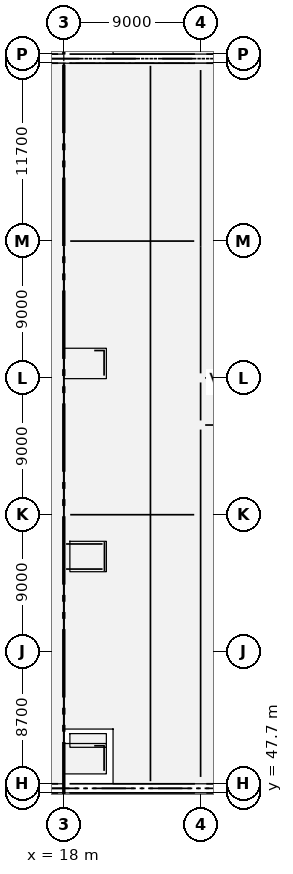
"""IFC4 building model, lengths in metres.
Left out: names, types, materials, properties, quantities, classifications, styles, units other than length and angle.
Written with IfcOpenShell. Run it as: python <this file> out.ifc"""

import sys

from ifc_helpers import new_model, si_unit, direction, frame, frame_2d, origin, origin_2d, place, context, subcontext, project, spatial, rectangle, extrude, element, fill, save


model = new_model("IFC4")
c1 = context("Model", 3, precision=1e-05, world=origin(), true_north=direction((0.0, 1.0)))
c2 = subcontext(c1, "Body", "Model", "MODEL_VIEW")
j1 = project(units=[si_unit("LENGTHUNIT", "METRE"), si_unit("PLANEANGLEUNIT", "RADIAN")], contexts=[c1])
p1 = place(None, origin())
s1 = spatial("IfcSite", under=j1, at=p1, CompositionType="ELEMENT")
p2 = place(p1, origin())
s2 = spatial("IfcBuilding", under=s1, at=p2, CompositionType="ELEMENT")
p3 = place(p2, origin())
s3 = spatial("IfcBuildingStorey", under=s2, at=p3, CompositionType="ELEMENT", Elevation=0.0)
p4 = place(p3, frame((18.0, 24.0, -0.5), z_axis=(0.0, 0.0, 1.0), x_axis=(0.0, 1.0, 0.0)))
e1 = element("IfcWall", 1, at=p4, inside=s3, PredefinedType="SOLIDWALL", context=c2, shape_type="SweptSolid", body=[
    extrude(rectangle(XDim=23.7, YDim=0.3, at=frame_2d((11.85, 0.0))), origin(), (0.0, 0.0, 1.0), 1.725),
])
p5 = place(p3, frame((18.0, 48.3, -0.5), z_axis=(0.0, 0.0, 1.0), x_axis=(0.0, 1.0, 0.0)))
e2 = element("IfcWall", 2, at=p5, inside=s3, PredefinedType="SOLIDWALL", context=c2, shape_type="SweptSolid", body=[
    extrude(rectangle(XDim=47.4, YDim=0.3, at=frame_2d((23.7, 0.0))), origin(), (0.0, 0.0, 1.0), 1.725),
])
p6 = place(p3, frame((18.0, 96.3, -0.5), z_axis=(0.0, 0.0, 1.0), x_axis=(0.0, 1.0, 0.0)))
e3 = element("IfcWall", 3, at=p6, inside=s3, PredefinedType="SOLIDWALL", context=c2, shape_type="SweptSolid", body=[
    extrude(rectangle(XDim=47.7, YDim=0.3, at=frame_2d((23.85, 0.0))), origin(), (0.0, 0.0, 1.0), 1.725),
])
for number, where, z_axis, x_axis in (
    (4, (18.0, 47.7, -0.5), (0.0, 0.0, 1.0), (1.0, 0.0, 0.0)),
    (5, (18.0, 48.3, -0.5), (0.0, 0.0, 1.0), (1.0, 0.0, 0.0)),
):
    element("IfcColumn", number, at=place(p3, frame(where, z_axis=z_axis, x_axis=x_axis)), inside=s3, PredefinedType="COLUMN", context=c2, shape_type="SweptSolid", body=[
        extrude(rectangle(XDim=0.75, YDim=0.55, at=origin_2d()), origin(), (0.0, 0.0, 1.0), 6.8),
    ])
for number, where, z_axis, x_axis in (
    (6, (18.0, 57.0, -0.5), (0.0, 0.0, 1.0), (1.0, 0.0, 0.0)),
    (7, (18.0, 66.0, -0.5), (0.0, 0.0, 1.0), (1.0, 0.0, 0.0)),
    (8, (18.0, 75.0, -0.5), (0.0, 0.0, 1.0), (1.0, 0.0, 0.0)),
    (9, (18.0, 84.0, -0.5), (0.0, 0.0, 1.0), (1.0, 0.0, 0.0)),
):
    element("IfcColumn", number, at=place(p3, frame(where, z_axis=z_axis, x_axis=x_axis)), inside=s3, PredefinedType="COLUMN", context=c2, shape_type="SweptSolid", body=[
        extrude(rectangle(XDim=0.75, YDim=0.75, at=origin_2d()), origin(), (0.0, 0.0, 1.0), 6.8),
    ])
for number, where, z_axis, x_axis in (
    (10, (18.0, 95.7, -0.5), (0.0, 0.0, 1.0), (1.0, 0.0, 0.0)),
    (11, (18.0, 96.3, -0.5), (0.0, 0.0, 1.0), (1.0, 0.0, 0.0)),
    (12, (27.0, 47.7, -0.5), (0.0, 0.0, 1.0), (1.0, 0.0, 0.0)),
    (13, (27.0, 48.3, -0.5), (0.0, 0.0, 1.0), (1.0, 0.0, 0.0)),
):
    element("IfcColumn", number, at=place(p3, frame(where, z_axis=z_axis, x_axis=x_axis)), inside=s3, PredefinedType="COLUMN", context=c2, shape_type="SweptSolid", body=[
        extrude(rectangle(XDim=0.75, YDim=0.55, at=origin_2d()), origin(), (0.0, 0.0, 1.0), 6.8),
    ])
for number, where, z_axis, x_axis in (
    (14, (27.0, 57.0, -0.5), (0.0, 0.0, 1.0), (1.0, 0.0, 0.0)),
    (15, (27.0, 66.0, -0.5), (0.0, 0.0, 1.0), (1.0, 0.0, 0.0)),
    (16, (27.0, 75.0, -0.5), (0.0, 0.0, 1.0), (1.0, 0.0, 0.0)),
    (17, (27.0, 84.0, -0.5), (0.0, 0.0, 1.0), (1.0, 0.0, 0.0)),
):
    element("IfcColumn", number, at=place(p3, frame(where, z_axis=z_axis, x_axis=x_axis)), inside=s3, PredefinedType="COLUMN", context=c2, shape_type="SweptSolid", body=[
        extrude(rectangle(XDim=0.75, YDim=0.75, at=origin_2d()), origin(), (0.0, 0.0, 1.0), 6.8),
    ])
for number, where, z_axis, x_axis in (
    (18, (27.0, 95.7, -0.5), (0.0, 0.0, 1.0), (1.0, 0.0, 0.0)),
    (19, (27.0, 96.3, -0.5), (0.0, 0.0, 1.0), (1.0, 0.0, 0.0)),
):
    element("IfcColumn", number, at=place(p3, frame(where, z_axis=z_axis, x_axis=x_axis)), inside=s3, PredefinedType="COLUMN", context=c2, shape_type="SweptSolid", body=[
        extrude(rectangle(XDim=0.75, YDim=0.55, at=origin_2d()), origin(), (0.0, 0.0, 1.0), 6.8),
    ])
p7 = place(p3, frame((9.375, 47.7, 1.225), z_axis=(0.0, 0.0, 1.0), x_axis=(1.0, 0.0, 0.0)))
e20 = element("IfcWall", 20, at=p7, inside=s3, PredefinedType="SOLIDWALL", context=c2, shape_type="SweptSolid", body=[
    extrude(rectangle(XDim=8.25, YDim=0.32, at=frame_2d((4.125, 0.0))), origin(), (0.0, 0.0, 1.0), 3.875),
])
p8 = place(p7, frame((1.85, 0.0, 0.685)))
e21 = element("IfcOpeningElement", 21, at=p8, cuts=e20, PredefinedType="OPENING", context=c2, shape_type="SweptSolid", body=[
    extrude(rectangle(XDim=1.8, YDim=3.15, at=frame_2d((0.9, 1.575))), frame((0.0, 0.17, 0.0), z_axis=(0.0, -1.0, 0.0), x_axis=(1.0, 0.0, 0.0)), (0.0, 0.0, 1.0), 0.34),
])
p9 = place(p7, frame((4.6, 0.0, 0.685)))
e22 = element("IfcOpeningElement", 22, at=p9, cuts=e20, PredefinedType="OPENING", context=c2, shape_type="SweptSolid", body=[
    extrude(rectangle(XDim=1.8, YDim=3.15, at=frame_2d((0.9, 1.575))), frame((0.0, 0.17, 0.0), z_axis=(0.0, -1.0, 0.0), x_axis=(1.0, 0.0, 0.0)), (0.0, 0.0, 1.0), 0.34),
])
p10 = place(p3, frame((9.375, 48.3, 1.225), z_axis=(0.0, 0.0, 1.0), x_axis=(1.0, 0.0, 0.0)))
e23 = element("IfcWall", 23, at=p10, inside=s3, PredefinedType="SOLIDWALL", context=c2, shape_type="SweptSolid", body=[
    extrude(rectangle(XDim=8.25, YDim=0.32, at=frame_2d((4.125, 0.0))), origin(), (0.0, 0.0, 1.0), 3.875),
])
p11 = place(p10, frame((1.85, 0.0, 0.685)))
e24 = element("IfcOpeningElement", 24, at=p11, cuts=e23, PredefinedType="OPENING", context=c2, shape_type="SweptSolid", body=[
    extrude(rectangle(XDim=1.8, YDim=3.15, at=frame_2d((0.9, 1.575))), frame((0.0, 0.17, 0.0), z_axis=(0.0, -1.0, 0.0), x_axis=(1.0, 0.0, 0.0)), (0.0, 0.0, 1.0), 0.34),
])
p12 = place(p10, frame((4.6, 0.0, 0.685)))
e25 = element("IfcOpeningElement", 25, at=p12, cuts=e23, PredefinedType="OPENING", context=c2, shape_type="SweptSolid", body=[
    extrude(rectangle(XDim=1.8, YDim=3.15, at=frame_2d((0.9, 1.575))), frame((0.0, 0.17, 0.0), z_axis=(0.0, -1.0, 0.0), x_axis=(1.0, 0.0, 0.0)), (0.0, 0.0, 1.0), 0.34),
])
p13 = place(p3, frame((9.375, 95.7, 1.225), z_axis=(0.0, 0.0, 1.0), x_axis=(1.0, 0.0, 0.0)))
e26 = element("IfcWall", 26, at=p13, inside=s3, PredefinedType="SOLIDWALL", context=c2, shape_type="SweptSolid", body=[
    extrude(rectangle(XDim=8.25, YDim=0.32, at=frame_2d((4.125, 0.0))), origin(), (0.0, 0.0, 1.0), 3.875),
])
p14 = place(p13, frame((1.85, 0.0, 0.685)))
e27 = element("IfcOpeningElement", 27, at=p14, cuts=e26, PredefinedType="OPENING", context=c2, shape_type="SweptSolid", body=[
    extrude(rectangle(XDim=1.8, YDim=3.15, at=frame_2d((0.9, 1.575))), frame((0.0, 0.17, 0.0), z_axis=(0.0, -1.0, 0.0), x_axis=(1.0, 0.0, 0.0)), (0.0, 0.0, 1.0), 0.34),
])
p15 = place(p13, frame((4.6, 0.0, 0.685)))
e28 = element("IfcOpeningElement", 28, at=p15, cuts=e26, PredefinedType="OPENING", context=c2, shape_type="SweptSolid", body=[
    extrude(rectangle(XDim=1.8, YDim=3.15, at=frame_2d((0.9, 1.575))), frame((0.0, 0.17, 0.0), z_axis=(0.0, -1.0, 0.0), x_axis=(1.0, 0.0, 0.0)), (0.0, 0.0, 1.0), 0.34),
])
p16 = place(p3, frame((9.375, 96.3, 1.225), z_axis=(0.0, 0.0, 1.0), x_axis=(1.0, 0.0, 0.0)))
e29 = element("IfcWall", 29, at=p16, inside=s3, PredefinedType="SOLIDWALL", context=c2, shape_type="SweptSolid", body=[
    extrude(rectangle(XDim=8.25, YDim=0.32, at=frame_2d((4.125, 0.0))), origin(), (0.0, 0.0, 1.0), 3.875),
])
p17 = place(p16, frame((1.85, 0.0, 0.685)))
e30 = element("IfcOpeningElement", 30, at=p17, cuts=e29, PredefinedType="OPENING", context=c2, shape_type="SweptSolid", body=[
    extrude(rectangle(XDim=1.8, YDim=3.15, at=frame_2d((0.9, 1.575))), frame((0.0, 0.17, 0.0), z_axis=(0.0, -1.0, 0.0), x_axis=(1.0, 0.0, 0.0)), (0.0, 0.0, 1.0), 0.34),
])
p18 = place(p16, frame((4.6, 0.0, 0.685)))
e31 = element("IfcOpeningElement", 31, at=p18, cuts=e29, PredefinedType="OPENING", context=c2, shape_type="SweptSolid", body=[
    extrude(rectangle(XDim=1.8, YDim=3.15, at=frame_2d((0.9, 1.575))), frame((0.0, 0.17, 0.0), z_axis=(0.0, -1.0, 0.0), x_axis=(1.0, 0.0, 0.0)), (0.0, 0.0, 1.0), 0.34),
])
for number, where, z_axis, x_axis in (
    (32, (18.375, 47.7, 0.0), (0.0, 0.0, 1.0), (1.0, 0.0, 0.0)),
    (33, (27.375, 47.7, 0.0), (0.0, 0.0, 1.0), (1.0, 0.0, 0.0)),
):
    element("IfcWall", number, at=place(p3, frame(where, z_axis=z_axis, x_axis=x_axis)), inside=s3, PredefinedType="SOLIDWALL", context=c2, shape_type="SweptSolid", body=[
        extrude(rectangle(XDim=8.25, YDim=0.38, at=frame_2d((4.125, 0.0))), origin(), (0.0, 0.0, 1.0), 5.08),
    ])
p19 = place(p3, frame((18.375, 48.3, 0.0), z_axis=(0.0, 0.0, 1.0), x_axis=(1.0, 0.0, 0.0)))
e34 = element("IfcWall", 34, at=p19, inside=s3, PredefinedType="SOLIDWALL", context=c2, shape_type="SweptSolid", body=[
    extrude(rectangle(XDim=8.25, YDim=0.38, at=frame_2d((4.125, 0.0))), origin(), (0.0, 0.0, 1.0), 5.08),
])
p20 = place(p19, frame((3.325, 0.0, 3.59)))
e35 = element("IfcOpeningElement", 35, at=p20, cuts=e34, PredefinedType="OPENING", context=c2, shape_type="SweptSolid", body=[
    extrude(rectangle(XDim=1.6, YDim=1.45, at=frame_2d((0.8, 0.725))), frame((0.0, 0.2, 0.0), z_axis=(0.0, -1.0, 0.0), x_axis=(1.0, 0.0, 0.0)), (0.0, 0.0, 1.0), 0.4),
])
for number, where, z_axis, x_axis in (
    (36, (27.375, 48.3, 0.0), (0.0, 0.0, 1.0), (1.0, 0.0, 0.0)),
    (37, (18.375, 95.7, 0.0), (0.0, 0.0, 1.0), (1.0, 0.0, 0.0)),
    (38, (27.375, 95.7, 0.0), (0.0, 0.0, 1.0), (1.0, 0.0, 0.0)),
):
    element("IfcWall", number, at=place(p3, frame(where, z_axis=z_axis, x_axis=x_axis)), inside=s3, PredefinedType="SOLIDWALL", context=c2, shape_type="SweptSolid", body=[
        extrude(rectangle(XDim=8.25, YDim=0.38, at=frame_2d((4.125, 0.0))), origin(), (0.0, 0.0, 1.0), 5.08),
    ])
p21 = place(p3, frame((18.375, 96.3, 0.0), z_axis=(0.0, 0.0, 1.0), x_axis=(1.0, 0.0, 0.0)))
e39 = element("IfcWall", 39, at=p21, inside=s3, PredefinedType="SOLIDWALL", context=c2, shape_type="SweptSolid", body=[
    extrude(rectangle(XDim=8.25, YDim=0.38, at=frame_2d((4.125, 0.0))), origin(), (0.0, 0.0, 1.0), 5.08),
])
p22 = place(p21, frame((3.325, 0.0, 3.59)))
e40 = element("IfcOpeningElement", 40, at=p22, cuts=e39, PredefinedType="OPENING", context=c2, shape_type="SweptSolid", body=[
    extrude(rectangle(XDim=1.6, YDim=1.45, at=frame_2d((0.8, 0.725))), frame((0.0, 0.2, 0.0), z_axis=(0.0, -1.0, 0.0), x_axis=(1.0, 0.0, 0.0)), (0.0, 0.0, 1.0), 0.4),
])
p23 = place(p3, frame((27.375, 96.3, 0.0), z_axis=(0.0, 0.0, 1.0), x_axis=(1.0, 0.0, 0.0)))
e41 = element("IfcWall", 41, at=p23, inside=s3, PredefinedType="SOLIDWALL", context=c2, shape_type="SweptSolid", body=[
    extrude(rectangle(XDim=8.25, YDim=0.38, at=frame_2d((4.125, 0.0))), origin(), (0.0, 0.0, 1.0), 5.08),
])
p24 = place(p3, frame((20.65, 49.15, -0.5), z_axis=(0.0, 0.0, 1.0), x_axis=(0.0, 1.0, 0.0)))
e42 = element("IfcWall", 42, at=p24, inside=s3, PredefinedType="SOLIDWALL", context=c2, shape_type="SweptSolid", body=[
    extrude(rectangle(XDim=1.65, YDim=0.25, at=frame_2d((0.825, 0.0))), origin(), (0.0, 0.0, 1.0), 1.325),
])
p25 = place(p3, frame((20.0, 50.8, -0.5), z_axis=(0.0, 0.0, 1.0), x_axis=(1.0, 0.0, 0.0)))
e43 = element("IfcWall", 43, at=p25, inside=s3, PredefinedType="SOLIDWALL", context=c2, shape_type="SweptSolid", body=[
    extrude(rectangle(XDim=0.7, YDim=0.25, at=frame_2d((0.35, 0.0))), origin(), (0.0, 0.0, 1.0), 1.325),
])
p26 = place(p3, frame((20.675, 62.3, 0.0), z_axis=(0.0, 0.0, 1.0), x_axis=(0.0, 1.0, 0.0)))
e44 = element("IfcWall", 44, at=p26, inside=s3, PredefinedType="SOLIDWALL", context=c2, shape_type="SweptSolid", body=[
    extrude(rectangle(XDim=1.9, YDim=0.25, at=frame_2d((0.95, 0.0))), origin(), (0.0, 0.0, 1.0), 0.025),
])
for number, where, z_axis, x_axis in (
    (45, (18.15, 62.425, 0.0), (0.0, 0.0, 1.0), (1.0, 0.0, 0.0)),
    (46, (18.15, 64.075, 0.0), (0.0, 0.0, 1.0), (1.0, 0.0, 0.0)),
):
    element("IfcWall", number, at=place(p3, frame(where, z_axis=z_axis, x_axis=x_axis)), inside=s3, PredefinedType="SOLIDWALL", context=c2, shape_type="SweptSolid", body=[
        extrude(rectangle(XDim=2.4, YDim=0.25, at=frame_2d((1.2, 0.0))), origin(), (0.0, 0.0, 1.0), 0.025),
    ])
p27 = place(p3, frame((20.65, 75.15, -0.5), z_axis=(0.0, 0.0, 1.0), x_axis=(0.0, 1.0, 0.0)))
e47 = element("IfcWall", 47, at=p27, inside=s3, PredefinedType="SOLIDWALL", context=c2, shape_type="SweptSolid", body=[
    extrude(rectangle(XDim=1.65, YDim=0.25, at=frame_2d((0.825, 0.0))), origin(), (0.0, 0.0, 1.0), 1.325),
])
p28 = place(p3, frame((20.0, 76.8, -0.5), z_axis=(0.0, 0.0, 1.0), x_axis=(1.0, 0.0, 0.0)))
e48 = element("IfcWall", 48, at=p28, inside=s3, PredefinedType="SOLIDWALL", context=c2, shape_type="SweptSolid", body=[
    extrude(rectangle(XDim=0.7, YDim=0.25, at=frame_2d((0.35, 0.0))), origin(), (0.0, 0.0, 1.0), 1.325),
])
for number, where, z_axis, x_axis in (
    (49, (18.42, 66.0, -0.5), (0.0, 0.0, 1.0), (1.0, 0.0, 0.0)),
    (50, (18.42, 84.0, -0.5), (0.0, 0.0, 1.0), (1.0, 0.0, 0.0)),
):
    element("IfcWall", number, at=place(p3, frame(where, z_axis=z_axis, x_axis=x_axis)), inside=s3, PredefinedType="SHEAR", context=c2, shape_type="SweptSolid", body=[
        extrude(rectangle(XDim=8.16, YDim=0.33, at=frame_2d((4.08, 0.0))), origin(), (0.0, 0.0, 1.0), 6.48),
    ])
p29 = place(p3, frame((18.0, 48.72, 1.225), z_axis=(0.0, 0.0, 1.0), x_axis=(0.0, 1.0, 0.0)))
e51 = element("IfcWall", 51, at=p29, inside=s3, PredefinedType="STANDARD", context=c2, shape_type="SweptSolid", body=[
    extrude(rectangle(XDim=7.86, YDim=0.255, at=frame_2d((3.93, 0.0))), origin(), (0.0, 0.0, 1.0), 3.955),
])
p30 = place(p3, frame((18.0, 57.42, 1.225), z_axis=(0.0, 0.0, 1.0), x_axis=(0.0, 1.0, 0.0)))
e52 = element("IfcWall", 52, at=p30, inside=s3, PredefinedType="STANDARD", context=c2, shape_type="SweptSolid", body=[
    extrude(rectangle(XDim=8.16, YDim=0.255, at=frame_2d((4.08, 0.0))), origin(), (0.0, 0.0, 1.0), 3.955),
])
p31 = place(p30, frame((4.43, 0.0, 0.0)))
e53 = element("IfcOpeningElement", 53, at=p31, cuts=e52, PredefinedType="OPENING", context=c2, shape_type="SweptSolid", body=[
    extrude(rectangle(XDim=1.8, YDim=2.3, at=frame_2d((0.9, 1.15))), frame((0.0, 0.137, 0.0), z_axis=(0.0, -1.0, 0.0), x_axis=(1.0, 0.0, 0.0)), (0.0, 0.0, 1.0), 0.275),
])
for number, where, z_axis, x_axis in (
    (54, (18.0, 66.42, 1.225), (0.0, 0.0, 1.0), (0.0, 1.0, 0.0)),
    (55, (18.0, 75.42, 1.225), (0.0, 0.0, 1.0), (0.0, 1.0, 0.0)),
):
    element("IfcWall", number, at=place(p3, frame(where, z_axis=z_axis, x_axis=x_axis)), inside=s3, PredefinedType="STANDARD", context=c2, shape_type="SweptSolid", body=[
        extrude(rectangle(XDim=8.16, YDim=0.255, at=frame_2d((4.08, 0.0))), origin(), (0.0, 0.0, 1.0), 3.955),
    ])
p32 = place(p3, frame((18.0, 84.42, 1.225), z_axis=(0.0, 0.0, 1.0), x_axis=(0.0, 1.0, 0.0)))
e56 = element("IfcWall", 56, at=p32, inside=s3, PredefinedType="STANDARD", context=c2, shape_type="SweptSolid", body=[
    extrude(rectangle(XDim=10.86, YDim=0.255, at=frame_2d((5.43, 0.0))), origin(), (0.0, 0.0, 1.0), 3.605),
])
p33 = place(p3, frame((23.7, 48.47, 0.0), z_axis=(0.0, 0.0, 1.0), x_axis=(0.0, 1.0, 0.0)))
e57 = element("IfcWall", 57, at=p33, inside=s3, PredefinedType="PARTITIONING", context=c2, shape_type="SweptSolid", body=[
    extrude(rectangle(XDim=47.06, YDim=0.11, at=frame_2d((23.53, 0.0))), origin(), (0.0, 0.0, 1.0), 5.95),
])
p34 = place(p33, frame((40.615, 0.0, 0.0)))
e58 = element("IfcOpeningElement", 58, at=p34, cuts=e57, PredefinedType="OPENING", context=c2, shape_type="SweptSolid", body=[
    extrude(rectangle(XDim=1.08, YDim=2.15, at=frame_2d((0.54, 1.075))), frame((0.0, 0.065, 0.0), z_axis=(0.0, -1.0, 0.0), x_axis=(1.0, 0.0, 0.0)), (0.0, 0.0, 1.0), 0.13),
])
p35 = place(p3, frame((27.0, 72.2, 0.0), z_axis=(0.0, 0.0, 1.0), x_axis=(0.0, 1.0, 0.0)))
e59 = element("IfcWall", 59, at=p35, inside=s3, PredefinedType="PARTITIONING", context=c2, shape_type="SweptSolid", body=[
    extrude(rectangle(XDim=2.5, YDim=0.1, at=frame_2d((1.25, 0.0))), origin(), (0.0, 0.0, 1.0), 5.18),
])
p36 = place(p35, frame((0.78, 0.0, 0.0)))
e60 = element("IfcOpeningElement", 60, at=p36, cuts=e59, PredefinedType="OPENING", context=c2, shape_type="SweptSolid", body=[
    extrude(rectangle(XDim=0.94, YDim=2.14, at=frame_2d((0.47, 1.07))), frame((0.0, 0.06, 0.0), z_axis=(0.0, -1.0, 0.0), x_axis=(1.0, 0.0, 0.0)), (0.0, 0.0, 1.0), 0.12),
])
p37 = place(p3, frame((27.0, 48.75, 0.0), z_axis=(0.0, 0.0, 1.0), x_axis=(0.0, 1.0, 0.0)))
e61 = element("IfcWall", 61, at=p37, inside=s3, PredefinedType="STANDARD", context=c2, shape_type="SweptSolid", body=[
    extrude(rectangle(XDim=22.85, YDim=0.21, at=frame_2d((11.425, 0.0))), origin(), (0.0, 0.0, 1.0), 5.18),
])
p38 = place(p37, frame((11.75, 0.0, 0.0)))
e62 = element("IfcOpeningElement", 62, at=p38, cuts=e61, PredefinedType="OPENING", context=c2, shape_type="SweptSolid", body=[
    extrude(rectangle(XDim=2.0, YDim=2.5, at=frame_2d((1.0, 1.25))), frame((0.0, 0.115, 0.0), z_axis=(0.0, -1.0, 0.0), x_axis=(1.0, 0.0, 0.0)), (0.0, 0.0, 1.0), 0.23),
])
p39 = place(p3, frame((27.0, 75.3, 0.0), z_axis=(0.0, 0.0, 1.0), x_axis=(0.0, 1.0, 0.0)))
e63 = element("IfcWall", 63, at=p39, inside=s3, PredefinedType="STANDARD", context=c2, shape_type="SweptSolid", body=[
    extrude(rectangle(XDim=8.325, YDim=0.195, at=frame_2d((4.163, 0.0))), origin(), (0.0, 0.0, 1.0), 5.18),
])
p40 = place(p3, frame((27.3, 71.9, 0.0), z_axis=(0.0, 0.0, 1.0), x_axis=(1.0, 0.0, 0.0)))
e64 = element("IfcWall", 64, at=p40, inside=s3, PredefinedType="STANDARD", context=c2, shape_type="SweptSolid", body=[
    extrude(rectangle(XDim=26.4, YDim=0.21, at=frame_2d((13.2, 0.0))), origin(), (0.0, 0.0, 1.0), 5.95),
])
p41 = place(p40, frame((12.27, 0.0, 0.0)))
e65 = element("IfcOpeningElement", 65, at=p41, cuts=e64, PredefinedType="OPENING", context=c2, shape_type="SweptSolid", body=[
    extrude(rectangle(XDim=1.86, YDim=2.45, at=frame_2d((0.93, 1.225))), frame((0.0, 0.115, 0.0), z_axis=(0.0, -1.0, 0.0), x_axis=(1.0, 0.0, 0.0)), (0.0, 0.0, 1.0), 0.23),
])
p42 = place(p3, frame((27.3, 75.0, 0.0), z_axis=(0.0, 0.0, 1.0), x_axis=(1.0, 0.0, 0.0)))
e66 = element("IfcWall", 66, at=p42, inside=s3, PredefinedType="STANDARD", context=c2, shape_type="SweptSolid", body=[
    extrude(rectangle(XDim=26.4, YDim=0.195, at=frame_2d((13.2, 0.0))), origin(), (0.0, 0.0, 1.0), 5.13),
])
p43 = place(p42, frame((12.125, 0.0, 0.0)))
e67 = element("IfcOpeningElement", 67, at=p43, cuts=e66, PredefinedType="OPENING", context=c2, shape_type="SweptSolid", body=[
    extrude(rectangle(XDim=2.15, YDim=2.55, at=frame_2d((1.075, 1.275))), frame((0.0, 0.107, 0.0), z_axis=(0.0, -1.0, 0.0), x_axis=(1.0, 0.0, 0.0)), (0.0, 0.0, 1.0), 0.215),
])
p44 = place(p3, frame((27.0, 83.625, 0.0), z_axis=(0.0, 0.0, 1.0), x_axis=(0.0, 1.0, 0.0)))
e68 = element("IfcWall", 68, at=p44, inside=s3, PredefinedType="STANDARD", context=c2, shape_type="SweptSolid", body=[
    extrude(rectangle(XDim=11.625, YDim=0.195, at=frame_2d((5.812, 0.0))), origin(), (0.0, 0.0, 1.0), 4.83),
])
p45 = place(p44, frame((5.15, 0.0, 0.0)))
e69 = element("IfcOpeningElement", 69, at=p45, cuts=e68, PredefinedType="OPENING", context=c2, shape_type="SweptSolid", body=[
    extrude(rectangle(XDim=1.7, YDim=2.4, at=frame_2d((0.85, 1.2))), frame((0.0, 0.107, 0.0), z_axis=(0.0, -1.0, 0.0), x_axis=(1.0, 0.0, 0.0)), (0.0, 0.0, 1.0), 0.215),
])
p46 = place(p20, origin())
e70 = element("IfcWindow", 70, at=p46, inside=s3, PartitioningType="DOUBLE_PANEL_HORIZONTAL", PredefinedType="WINDOW", context=c2, shape_type="SweptSolid", body=[
    extrude(rectangle(XDim=1.6, YDim=1.45, at=frame_2d((0.8, 0.725))), frame((0.0, 0.03, 0.0), z_axis=(0.0, -1.0, 0.0), x_axis=(1.0, 0.0, 0.0)), (0.0, 0.0, 1.0), 0.06),
])
fill(e35, e70)
p47 = place(p22, origin())
e71 = element("IfcWindow", 71, at=p47, inside=s3, PartitioningType="DOUBLE_PANEL_HORIZONTAL", PredefinedType="WINDOW", context=c2, shape_type="SweptSolid", body=[
    extrude(rectangle(XDim=1.6, YDim=1.45, at=frame_2d((0.8, 0.725))), frame((0.0, 0.03, 0.0), z_axis=(0.0, -1.0, 0.0), x_axis=(1.0, 0.0, 0.0)), (0.0, 0.0, 1.0), 0.06),
])
fill(e40, e71)
p48 = place(p31, origin())
e72 = element("IfcDoor", 72, at=p48, inside=s3, OperationType="SINGLE_SWING_RIGHT", PredefinedType="DOOR", context=c2, shape_type="SweptSolid", body=[
    extrude(rectangle(XDim=1.8, YDim=2.3, at=frame_2d((0.9, 1.15))), frame((0.0, 0.025, 0.0), z_axis=(0.0, -1.0, 0.0), x_axis=(1.0, 0.0, 0.0)), (0.0, 0.0, 1.0), 0.05),
])
fill(e53, e72)
p49 = place(p34, origin())
e73 = element("IfcDoor", 73, at=p49, inside=s3, OperationType="SINGLE_SWING_RIGHT", PredefinedType="DOOR", context=c2, shape_type="SweptSolid", body=[
    extrude(rectangle(XDim=1.08, YDim=2.15, at=frame_2d((0.54, 1.075))), frame((0.0, 0.025, 0.0), z_axis=(0.0, -1.0, 0.0), x_axis=(1.0, 0.0, 0.0)), (0.0, 0.0, 1.0), 0.05),
])
fill(e58, e73)
p50 = place(p36, origin())
e74 = element("IfcDoor", 74, at=p50, inside=s3, OperationType="SINGLE_SWING_LEFT", PredefinedType="DOOR", context=c2, shape_type="SweptSolid", body=[
    extrude(rectangle(XDim=0.94, YDim=2.14, at=frame_2d((0.47, 1.07))), frame((0.0, 0.025, 0.0), z_axis=(0.0, -1.0, 0.0), x_axis=(1.0, 0.0, 0.0)), (0.0, 0.0, 1.0), 0.05),
])
fill(e60, e74)
p51 = place(p38, origin())
e75 = element("IfcDoor", 75, at=p51, inside=s3, OperationType="SLIDING_TO_LEFT", PredefinedType="DOOR", context=c2, shape_type="SweptSolid", body=[
    extrude(rectangle(XDim=2.0, YDim=2.5, at=frame_2d((1.0, 1.25))), frame((0.0, 0.025, 0.0), z_axis=(0.0, -1.0, 0.0), x_axis=(1.0, 0.0, 0.0)), (0.0, 0.0, 1.0), 0.05),
])
fill(e62, e75)
p52 = place(p45, origin())
e76 = element("IfcDoor", 76, at=p52, inside=s3, OperationType="SLIDING_TO_LEFT", PredefinedType="DOOR", context=c2, shape_type="SweptSolid", body=[
    extrude(rectangle(XDim=1.7, YDim=2.4, at=frame_2d((0.85, 1.2))), frame((0.0, 0.025, 0.0), z_axis=(0.0, -1.0, 0.0), x_axis=(1.0, 0.0, 0.0)), (0.0, 0.0, 1.0), 0.05),
])
fill(e69, e76)
save(model, sys.argv[1])
